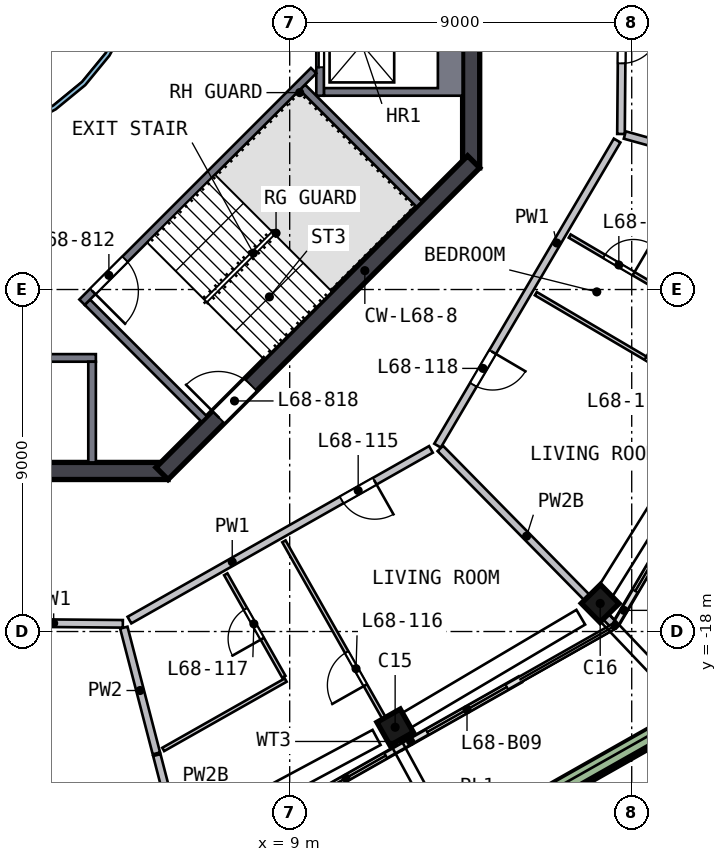
"""IFC4 building model, lengths in metres.
Left out: names, types, materials, properties, quantities, classifications, styles, units other than length and angle.
Written with IfcOpenShell. Run it as: python <this file> out.ifc"""

import sys

from ifc_helpers import new_model, si_unit, direction, frame, frame_2d, origin, origin_2d, place, context, subcontext, project, spatial, polyline, rectangle, outline, extrude, element, fill, save


model = new_model("IFC4")
c1 = context("Model", 3, precision=1e-05, world=origin(), true_north=direction((0.0, 1.0)))
c2 = subcontext(c1, "Body", "Model", "MODEL_VIEW")
j1 = project(units=[si_unit("LENGTHUNIT", "METRE"), si_unit("PLANEANGLEUNIT", "RADIAN")], contexts=[c1])
p1 = place(None, origin())
s1 = spatial("IfcSite", under=j1, at=p1, CompositionType="ELEMENT")
p2 = place(p1, origin())
s2 = spatial("IfcBuilding", under=s1, at=p2, CompositionType="ELEMENT")
p3 = place(p2, frame((0.0, 0.0, 277.5)))
s3 = spatial("IfcBuildingStorey", under=s2, at=p3, CompositionType="ELEMENT", Elevation=277.5)
p4 = place(p3, frame((11.657, -20.587, 0.0), z_axis=(0.097493601, 0.056275557, 0.993643829), x_axis=(0.864752693, 0.4894198, -0.112565713)))
e1 = element("IfcColumn", 1, at=p4, inside=s3, PredefinedType="COLUMN", context=c2, shape_type="SweptSolid", body=[
    extrude(rectangle(XDim=0.7, YDim=0.7, at=origin_2d()), origin(), (0.0, 0.0, 1.0), 3.21),
])
p5 = place(p3, frame((17.072, -17.36, 0.0), z_axis=(0.081873788, 0.081797768, 0.993280327), x_axis=(-0.708616908, -0.696037958, 0.115729164)))
e2 = element("IfcColumn", 2, at=p5, inside=s3, PredefinedType="COLUMN", context=c2, shape_type="SweptSolid", body=[
    extrude(rectangle(XDim=0.7, YDim=0.7, at=origin_2d()), origin(), (0.0, 0.0, 1.0), 3.211),
])
p6 = place(p3, frame((13.775, -5.799, 0.0), z_axis=(0.0, 0.0, 1.0), x_axis=(0.0, 1.0, 0.0)))
e3 = element("IfcWall", 3, at=p6, inside=s3, PredefinedType="SHEAR", context=c2, shape_type="SweptSolid", body=[
    extrude(rectangle(XDim=11.598, YDim=0.45, at=frame_2d((5.799, 0.0))), origin(), (0.0, 0.0, 1.0), 3.5),
])
p7 = place(p6, frame((4.899, 0.0, 0.0)))
e4 = element("IfcOpeningElement", 4, at=p7, cuts=e3, PredefinedType="OPENING", context=c2, shape_type="SweptSolid", body=[
    extrude(rectangle(XDim=1.8, YDim=2.1, at=frame_2d((0.9, 1.05))), frame((0.0, 0.235, 0.0), z_axis=(0.0, -1.0, 0.0), x_axis=(1.0, 0.0, 0.0)), (0.0, 0.0, 1.0), 0.47),
])
p8 = place(p3, frame((-5.799, -13.775, 0.0), z_axis=(0.0, 0.0, 1.0), x_axis=(1.0, 0.0, 0.0)))
e5 = element("IfcWall", 5, at=p8, inside=s3, PredefinedType="SHEAR", context=c2, shape_type="SweptSolid", body=[
    extrude(rectangle(XDim=11.598, YDim=0.45, at=frame_2d((5.799, 0.0))), origin(), (0.0, 0.0, 1.0), 3.5),
])
p9 = place(p3, frame((5.64, -13.841, 0.0), z_axis=(0.0, 0.0, 1.0), x_axis=(0.707106781, 0.707106781, 0.0)))
e6 = element("IfcWall", 6, at=p9, inside=s3, PredefinedType="SHEAR", context=c2, shape_type="SweptSolid", body=[
    extrude(rectangle(XDim=11.598, YDim=0.45, at=frame_2d((5.799, 0.0))), origin(), (0.0, 0.0, 1.0), 3.5),
])
p10 = place(p9, frame((2.099, 0.0, 0.0)))
e7 = element("IfcOpeningElement", 7, at=p10, cuts=e6, PredefinedType="OPENING", context=c2, shape_type="SweptSolid", body=[
    extrude(rectangle(XDim=1.2, YDim=2.1, at=frame_2d((0.6, 1.05))), frame((0.0, 0.235, 0.0), z_axis=(0.0, -1.0, 0.0), x_axis=(1.0, 0.0, 0.0)), (0.0, 0.0, 1.0), 0.47),
])
p11 = place(p3, frame((9.088, -22.645, 0.0), z_axis=(0.0, 0.0, 1.0), x_axis=(0.870191834, 0.492713073, 0.0)))
e8 = element("IfcWall", 8, at=p11, inside=s3, PredefinedType="SOLIDWALL", context=c2, shape_type="SweptSolid", body=[
    extrude(rectangle(XDim=3.25, YDim=0.15, at=frame_2d((1.625, 0.0))), origin(), (0.0, 0.0, 1.0), 2.525),
])
p12 = place(p11, frame((0.4, 0.0, 0.0)))
e9 = element("IfcOpeningElement", 9, at=p12, cuts=e8, PredefinedType="OPENING", context=c2, shape_type="SweptSolid", body=[
    extrude(rectangle(XDim=2.4, YDim=2.4, at=frame_2d((1.2, 1.2))), frame((0.0, 0.085, 0.0), z_axis=(0.0, -1.0, 0.0), x_axis=(1.0, 0.0, 0.0)), (0.0, 0.0, 1.0), 0.17),
])
p13 = place(p3, frame((11.916, -21.044, 0.0), z_axis=(0.0, 0.0, 1.0), x_axis=(0.870199981, 0.492698684, 0.0)))
e10 = element("IfcWall", 10, at=p13, inside=s3, PredefinedType="SOLIDWALL", context=c2, shape_type="SweptSolid", body=[
    extrude(rectangle(XDim=3.611, YDim=0.15, at=frame_2d((1.806, 0.0))), origin(), (0.0, 0.0, 1.0), 2.525),
])
p14 = place(p13, frame((0.811, 0.0, 0.0)))
e11 = element("IfcOpeningElement", 11, at=p14, cuts=e10, PredefinedType="OPENING", context=c2, shape_type="SweptSolid", body=[
    extrude(rectangle(XDim=2.4, YDim=2.4, at=frame_2d((1.2, 1.2))), frame((0.0, 0.085, 0.0), z_axis=(0.0, -1.0, 0.0), x_axis=(1.0, 0.0, 0.0)), (0.0, 0.0, 1.0), 0.17),
])
p15 = place(p3, frame((17.595, -17.782, 0.0), z_axis=(0.0, 0.0, 1.0), x_axis=(0.507242714, 0.861803243, 0.0)))
e12 = element("IfcWall", 12, at=p15, inside=s3, PredefinedType="SOLIDWALL", context=c2, shape_type="SweptSolid", body=[
    extrude(rectangle(XDim=3.786, YDim=0.15, at=frame_2d((1.893, 0.0))), origin(), (0.0, 0.0, 1.0), 2.525),
])
p16 = place(p15, frame((0.987, 0.0, 0.0)))
e13 = element("IfcOpeningElement", 13, at=p16, cuts=e12, PredefinedType="OPENING", context=c2, shape_type="SweptSolid", body=[
    extrude(rectangle(XDim=2.4, YDim=2.4, at=frame_2d((1.2, 1.2))), frame((0.0, 0.085, 0.0), z_axis=(0.0, -1.0, 0.0), x_axis=(1.0, 0.0, 0.0)), (0.0, 0.0, 1.0), 0.17),
])
p17 = place(p3, frame((8.185, -26.633, 0.0), z_axis=(0.0, 0.0, 1.0), x_axis=(0.870181581, 0.492731181, 0.0)))
e14 = element("IfcWall", 14, at=p17, inside=s3, PredefinedType="SOLIDWALL", context=c2, shape_type="SweptSolid", body=[
    extrude(rectangle(XDim=13.223, YDim=0.5, at=frame_2d((6.612, 0.0))), origin(), (0.0, 0.0, 1.0), 0.7),
])
p18 = place(p3, origin())
e15 = element("IfcWall", 15, at=p18, inside=s3, PredefinedType="SOLIDWALL", context=c2, shape_type="SweptSolid", body=[
    extrude(outline(polyline([(13.55, -3.9), (9.9, -3.9), (9.9, -3.7), (12.9, -3.7), (12.9, -1.4), (9.9, -1.4), (9.9, -1.2), (13.55, -1.2), (13.55, -3.9)])), origin(), (0.0, 0.0, 1.0), 3.19),
])
p19 = place(p3, frame((9.8, -1.2, 0.0), z_axis=(0.0, 0.0, 1.0), x_axis=(0.0, -1.0, 0.0)))
e16 = element("IfcWall", 16, at=p19, inside=s3, PredefinedType="SOLIDWALL", context=c2, shape_type="SweptSolid", body=[
    extrude(rectangle(XDim=2.7, YDim=0.2, at=frame_2d((1.35, 0.0))), origin(), (0.0, 0.0, 1.0), 3.19),
])
p20 = place(p19, frame((0.75, 0.0, 0.0)))
e17 = element("IfcOpeningElement", 17, at=p20, cuts=e16, PredefinedType="OPENING", context=c2, shape_type="SweptSolid", body=[
    extrude(rectangle(XDim=1.2, YDim=2.1, at=frame_2d((0.6, 1.05))), frame((0.0, 0.11, 0.0), z_axis=(0.0, -1.0, 0.0), x_axis=(1.0, 0.0, 0.0)), (0.0, 0.0, 1.0), 0.22),
])
p21 = place(p3, frame((-3.9, -10.8, 0.0), z_axis=(0.0, 0.0, 1.0), x_axis=(1.0, 0.0, 0.0)))
e18 = element("IfcWall", 18, at=p21, inside=s3, PredefinedType="SOLIDWALL", context=c2, shape_type="SweptSolid", body=[
    extrude(rectangle(XDim=7.8, YDim=0.2, at=frame_2d((3.9, 0.0))), origin(), (0.0, 0.0, 1.0), 3.19),
])
p22 = place(p21, frame((3.45, 0.0, 0.0)))
e19 = element("IfcOpeningElement", 19, at=p22, cuts=e18, PredefinedType="OPENING", context=c2, shape_type="SweptSolid", body=[
    extrude(rectangle(XDim=0.9, YDim=2.1, at=frame_2d((0.45, 1.05))), frame((0.0, 0.11, 0.0), z_axis=(0.0, -1.0, 0.0), x_axis=(1.0, 0.0, 0.0)), (0.0, 0.0, 1.0), 0.22),
])
p23 = place(p3, frame((3.8, -10.9, 0.0), z_axis=(0.0, 0.0, 1.0), x_axis=(0.0, -1.0, 0.0)))
e20 = element("IfcWall", 20, at=p23, inside=s3, PredefinedType="SOLIDWALL", context=c2, shape_type="SweptSolid", body=[
    extrude(rectangle(XDim=2.65, YDim=0.2, at=frame_2d((1.325, 0.0))), origin(), (0.0, 0.0, 1.0), 3.19),
])
p24 = place(p3, frame((9.629, -3.24, 0.0), z_axis=(0.0, 0.0, 1.0), x_axis=(-0.707120946, -0.707092617, 0.0)))
e21 = element("IfcWall", 21, at=p24, inside=s3, PredefinedType="SOLIDWALL", context=c2, shape_type="SweptSolid", body=[
    extrude(rectangle(XDim=8.618, YDim=0.2, at=frame_2d((4.309, 0.0))), origin(), (0.0, 0.0, 1.0), 3.19),
])
p25 = place(p24, frame((7.018, 0.0, 0.0)))
e22 = element("IfcOpeningElement", 22, at=p25, cuts=e21, PredefinedType="OPENING", context=c2, shape_type="SweptSolid", body=[
    extrude(rectangle(XDim=1.2, YDim=2.1, at=frame_2d((0.6, 1.05))), frame((0.0, 0.11, 0.0), z_axis=(0.0, -1.0, 0.0), x_axis=(1.0, 0.0, 0.0)), (0.0, 0.0, 1.0), 0.22),
])
for number, where, z_axis, x_axis in (
    (23, (3.677, -9.334, 0.0), (0.0, 0.0, 1.0), (0.707, -0.707, 0.0)),
    (24, (9.334, -3.677, 0.0), (0.0, 0.0, 1.0), (0.707, -0.707, 0.0)),
):
    element("IfcWall", number, at=place(p3, frame(where, z_axis=z_axis, x_axis=x_axis)), inside=s3, PredefinedType="SOLIDWALL", context=c2, shape_type="SweptSolid", body=[
        extrude(rectangle(XDim=4.35, YDim=0.2, at=frame_2d((2.175, 0.0))), origin(), (0.0, 0.0, 1.0), 3.19),
    ])
p26 = place(p3, origin())
e25 = element("IfcWall", 25, at=p26, inside=s3, PredefinedType="SOLIDWALL", context=c2, shape_type="SweptSolid", body=[
    extrude(outline(polyline([(5.021, -0.999), (4.73, -1.959), (4.257, -2.844), (3.62, -3.62), (2.844, -4.257), (1.959, -4.73), (0.999, -5.021), (0.0, -5.12), (-0.999, -5.021), (-1.959, -4.73), (-2.844, -4.257), (-3.62, -3.62), (-4.257, -2.844), (-4.73, -1.959), (-5.021, -0.999), (-5.12, 0.0), (-5.021, 0.999), (-4.73, 1.959), (-4.257, 2.844), (-3.62, 3.62), (-2.844, 4.257), (-1.959, 4.73), (-0.999, 5.021), (0.0, 5.12), (0.999, 5.021), (1.959, 4.73), (2.844, 4.257), (3.62, 3.62), (4.257, 2.844), (4.73, 1.959), (5.021, 0.999), (5.12, 0.0), (5.021, -0.999)]), holes=[polyline([(4.904, 0.976), (4.619, 1.913), (4.157, 2.778), (3.535, 3.535), (2.778, 4.157), (1.913, 4.619), (0.976, 4.904), (0.0, 5.0), (-0.976, 4.904), (-1.913, 4.619), (-2.778, 4.157), (-3.535, 3.535), (-4.157, 2.778), (-4.619, 1.913), (-4.904, 0.976), (-5.0, 0.0), (-4.904, -0.976), (-4.619, -1.913), (-4.157, -2.778), (-3.535, -3.535), (-2.778, -4.157), (-1.913, -4.619), (-0.976, -4.904), (0.0, -5.0), (0.976, -4.904), (1.913, -4.619), (2.778, -4.157), (3.535, -3.535), (4.157, -2.778), (4.619, -1.913), (4.904, -0.976), (5.0, 0.0), (4.904, 0.976)])]), origin(), (0.0, 0.0, 1.0), 3.19),
])
p27 = place(p3, frame((4.609, -17.798, 0.0), z_axis=(0.0, 0.0, 1.0), x_axis=(-0.99996484, 0.008385669, 0.0)))
e26 = element("IfcWall", 26, at=p27, inside=s3, PredefinedType="SOLIDWALL", context=c2, shape_type="SweptSolid", body=[
    extrude(rectangle(XDim=9.316, YDim=0.2, at=frame_2d((4.658, 0.0))), origin(), (0.0, 0.0, 1.0), 3.19),
])
p28 = place(p27, frame((3.84, 0.0, 0.0)))
e27 = element("IfcOpeningElement", 27, at=p28, cuts=e26, PredefinedType="OPENING", context=c2, shape_type="SweptSolid", body=[
    extrude(rectangle(XDim=1.8, YDim=2.1, at=frame_2d((0.9, 1.05))), frame((0.0, 0.11, 0.0), z_axis=(0.0, -1.0, 0.0), x_axis=(1.0, 0.0, 0.0)), (0.0, 0.0, 1.0), 0.22),
])
p29 = place(p3, frame((12.717, -13.207, 0.0), z_axis=(0.0, 0.0, 1.0), x_axis=(-0.870186015, -0.492723349, 0.0)))
e28 = element("IfcWall", 28, at=p29, inside=s3, PredefinedType="SOLIDWALL", context=c2, shape_type="SweptSolid", body=[
    extrude(rectangle(XDim=9.116, YDim=0.2, at=frame_2d((4.558, 0.0))), origin(), (0.0, 0.0, 1.0), 3.19),
])
p30 = place(p29, frame((1.7, 0.0, 0.0)))
e29 = element("IfcOpeningElement", 29, at=p30, cuts=e28, PredefinedType="OPENING", context=c2, shape_type="SweptSolid", body=[
    extrude(rectangle(XDim=1.0, YDim=2.1, at=frame_2d((0.5, 1.05))), frame((0.0, 0.11, 0.0), z_axis=(0.0, -1.0, 0.0), x_axis=(1.0, 0.0, 0.0)), (0.0, 0.0, 1.0), 0.22),
])
p31 = place(p3, frame((17.616, -5.079, 0.0), z_axis=(0.0, 0.0, 1.0), x_axis=(-0.507248004, -0.861800129, 0.0)))
e30 = element("IfcWall", 30, at=p31, inside=s3, PredefinedType="SOLIDWALL", context=c2, shape_type="SweptSolid", body=[
    extrude(rectangle(XDim=9.317, YDim=0.2, at=frame_2d((4.658, 0.0))), origin(), (0.0, 0.0, 1.0), 3.19),
])
p32 = place(p31, frame((6.458, 0.0, 0.0)))
e31 = element("IfcOpeningElement", 31, at=p32, cuts=e30, PredefinedType="OPENING", context=c2, shape_type="SweptSolid", body=[
    extrude(rectangle(XDim=1.0, YDim=2.1, at=frame_2d((0.5, 1.05))), frame((0.0, 0.11, 0.0), z_axis=(0.0, -1.0, 0.0), x_axis=(1.0, 0.0, 0.0)), (0.0, 0.0, 1.0), 0.22),
])
p33 = place(p3, frame((17.796, 4.409, 0.0), z_axis=(0.0, 0.0, 1.0), x_axis=(-0.008385449, -0.999964842, 0.0)))
e32 = element("IfcWall", 32, at=p33, inside=s3, PredefinedType="SOLIDWALL", context=c2, shape_type="SweptSolid", body=[
    extrude(rectangle(XDim=9.317, YDim=0.2, at=frame_2d((4.658, 0.0))), origin(), (0.0, 0.0, 1.0), 3.19),
])
p34 = place(p33, frame((6.458, 0.0, 0.0)))
e33 = element("IfcOpeningElement", 33, at=p34, cuts=e32, PredefinedType="OPENING", context=c2, shape_type="SweptSolid", body=[
    extrude(rectangle(XDim=1.0, YDim=2.1, at=frame_2d((0.5, 1.05))), frame((0.0, 0.11, 0.0), z_axis=(0.0, -1.0, 0.0), x_axis=(1.0, 0.0, 0.0)), (0.0, 0.0, 1.0), 0.22),
])
p35 = place(p3, frame((4.635, -17.898, 0.0), z_axis=(0.0, 0.0, 1.0), x_axis=(0.250744047, -0.968053419, 0.0)))
e34 = element("IfcWall", 34, at=p35, inside=s3, PredefinedType="SOLIDWALL", context=c2, shape_type="SweptSolid", body=[
    extrude(rectangle(XDim=3.418, YDim=0.2, at=frame_2d((1.709, 0.0))), origin(), (0.0, 0.0, 1.0), 3.19),
])
p36 = place(p3, frame((5.504, -21.251, 0.0), z_axis=(0.0, 0.0, 1.0), x_axis=(0.250672354, -0.968071986, 0.0)))
e35 = element("IfcWall", 35, at=p36, inside=s3, PredefinedType="SOLIDWALL", context=c2, shape_type="SweptSolid", body=[
    extrude(rectangle(XDim=3.011, YDim=0.2, at=frame_2d((1.506, 0.0))), origin(), (0.0, 0.0, 1.0), 2.69),
])
p37 = place(p3, frame((12.963, -13.182, 0.0), z_axis=(0.0, 0.0, 1.0), x_axis=(0.701182118, -0.712982214, 0.0)))
e36 = element("IfcWall", 36, at=p37, inside=s3, PredefinedType="SOLIDWALL", context=c2, shape_type="SweptSolid", body=[
    extrude(rectangle(XDim=6.476, YDim=0.2, at=frame_2d((3.238, 0.0))), origin(), (0.0, 0.0, 1.0), 2.69),
])
p38 = place(p3, frame((17.818, -4.935, 0.0), z_axis=(0.0, 0.0, 1.0), x_axis=(0.963722387, -0.266906652, 0.0)))
e37 = element("IfcWall", 37, at=p38, inside=s3, PredefinedType="SOLIDWALL", context=c2, shape_type="SweptSolid", body=[
    extrude(rectangle(XDim=3.417, YDim=0.2, at=frame_2d((1.708, 0.0))), origin(), (0.0, 0.0, 1.0), 3.19),
])
p39 = place(p3, frame((5.672, -21.103, 0.0), z_axis=(0.0, 0.0, 1.0), x_axis=(0.870195537, 0.492706532, 0.0)))
e38 = element("IfcWall", 38, at=p39, inside=s3, PredefinedType="PARTITIONING", context=c2, shape_type="SweptSolid", body=[
    extrude(rectangle(XDim=3.704, YDim=0.1, at=frame_2d((1.852, 0.0))), origin(), (0.0, 0.0, 1.0), 3.19),
])
p40 = place(p3, frame((8.846, -19.191, 0.0), z_axis=(0.0, 0.0, 1.0), x_axis=(-0.492708506, 0.870194419, 0.0)))
e39 = element("IfcWall", 39, at=p40, inside=s3, PredefinedType="PARTITIONING", context=c2, shape_type="SweptSolid", body=[
    extrude(rectangle(XDim=3.1, YDim=0.1, at=frame_2d((1.55, 0.0))), origin(), (0.0, 0.0, 1.0), 3.19),
])
p41 = place(p40, frame((1.15, 0.0, 0.0)))
e40 = element("IfcOpeningElement", 40, at=p41, cuts=e39, PredefinedType="OPENING", context=c2, shape_type="SweptSolid", body=[
    extrude(rectangle(XDim=0.9, YDim=2.1, at=frame_2d((0.45, 1.05))), frame((0.0, 0.06, 0.0), z_axis=(0.0, -1.0, 0.0), x_axis=(1.0, 0.0, 0.0)), (0.0, 0.0, 1.0), 0.12),
])
p42 = place(p3, frame((11.879, -20.979, 0.0), z_axis=(0.0, 0.0, 1.0), x_axis=(-0.492715069, 0.870190704, 0.0)))
e41 = element("IfcWall", 41, at=p42, inside=s3, PredefinedType="PARTITIONING", context=c2, shape_type="SweptSolid", body=[
    extrude(rectangle(XDim=6.15, YDim=0.1, at=frame_2d((3.075, 0.0))), origin(), (0.0, 0.0, 1.0), 3.19),
])
p43 = place(p42, frame((1.8, 0.0, 0.0)))
e42 = element("IfcOpeningElement", 42, at=p43, cuts=e41, PredefinedType="OPENING", context=c2, shape_type="SweptSolid", body=[
    extrude(rectangle(XDim=1.0, YDim=2.1, at=frame_2d((0.5, 1.05))), frame((0.0, 0.06, 0.0), z_axis=(0.0, -1.0, 0.0), x_axis=(1.0, 0.0, 0.0)), (0.0, 0.0, 1.0), 0.12),
])
p44 = place(p3, frame((16.368, -7.594, 0.0), z_axis=(0.0, 0.0, 1.0), x_axis=(0.861798542, -0.5072507, 0.0)))
e43 = element("IfcWall", 43, at=p44, inside=s3, PredefinedType="PARTITIONING", context=c2, shape_type="SweptSolid", body=[
    extrude(rectangle(XDim=3.1, YDim=0.1, at=frame_2d((1.55, 0.0))), origin(), (0.0, 0.0, 1.0), 3.19),
])
p45 = place(p44, frame((1.05, 0.0, 0.0)))
e44 = element("IfcOpeningElement", 44, at=p45, cuts=e43, PredefinedType="OPENING", context=c2, shape_type="SweptSolid", body=[
    extrude(rectangle(XDim=0.9, YDim=2.1, at=frame_2d((0.45, 1.05))), frame((0.0, 0.06, 0.0), z_axis=(0.0, -1.0, 0.0), x_axis=(1.0, 0.0, 0.0)), (0.0, 0.0, 1.0), 0.12),
])
p46 = place(p3, frame((15.477, -9.109, 0.0), z_axis=(0.0, 0.0, 1.0), x_axis=(0.861795394, -0.507256048, 0.0)))
e45 = element("IfcWall", 45, at=p46, inside=s3, PredefinedType="PARTITIONING", context=c2, shape_type="SweptSolid", body=[
    extrude(rectangle(XDim=6.15, YDim=0.1, at=frame_2d((3.075, 0.0))), origin(), (0.0, 0.0, 1.0), 3.19),
])
p47 = place(p46, frame((3.35, 0.0, 0.0)))
e46 = element("IfcOpeningElement", 46, at=p47, cuts=e45, PredefinedType="OPENING", context=c2, shape_type="SweptSolid", body=[
    extrude(rectangle(XDim=1.0, YDim=2.1, at=frame_2d((0.5, 1.05))), frame((0.0, 0.06, 0.0), z_axis=(0.0, -1.0, 0.0), x_axis=(1.0, 0.0, 0.0)), (0.0, 0.0, 1.0), 0.12),
])
p48 = place(p12, origin())
e47 = element("IfcDoor", 47, at=p48, inside=s3, OperationType="SLIDING_TO_RIGHT", PredefinedType="DOOR", context=c2, shape_type="SweptSolid", body=[
    extrude(rectangle(XDim=2.4, YDim=2.4, at=frame_2d((1.2, 1.2))), frame((0.0, 0.025, 0.0), z_axis=(0.0, -1.0, 0.0), x_axis=(1.0, 0.0, 0.0)), (0.0, 0.0, 1.0), 0.05),
])
fill(e9, e47)
p49 = place(p14, origin())
e48 = element("IfcDoor", 48, at=p49, inside=s3, OperationType="SLIDING_TO_LEFT", PredefinedType="DOOR", context=c2, shape_type="SweptSolid", body=[
    extrude(rectangle(XDim=2.4, YDim=2.4, at=frame_2d((1.2, 1.2))), frame((0.0, 0.025, 0.0), z_axis=(0.0, -1.0, 0.0), x_axis=(1.0, 0.0, 0.0)), (0.0, 0.0, 1.0), 0.05),
])
fill(e11, e48)
p50 = place(p16, origin())
e49 = element("IfcDoor", 49, at=p50, inside=s3, OperationType="SLIDING_TO_LEFT", PredefinedType="DOOR", context=c2, shape_type="SweptSolid", body=[
    extrude(rectangle(XDim=2.4, YDim=2.4, at=frame_2d((1.2, 1.2))), frame((0.0, 0.025, 0.0), z_axis=(0.0, -1.0, 0.0), x_axis=(1.0, 0.0, 0.0)), (0.0, 0.0, 1.0), 0.05),
])
fill(e13, e49)
p51 = place(p20, origin())
e50 = element("IfcDoor", 50, at=p51, inside=s3, OperationType="DOUBLE_DOOR_SLIDING", PredefinedType="DOOR", context=c2, shape_type="SweptSolid", body=[
    extrude(rectangle(XDim=1.2, YDim=2.1, at=frame_2d((0.6, 1.05))), frame((0.0, 0.025, 0.0), z_axis=(0.0, -1.0, 0.0), x_axis=(1.0, 0.0, 0.0)), (0.0, 0.0, 1.0), 0.05),
])
fill(e17, e50)
p52 = place(p25, origin())
e51 = element("IfcDoor", 51, at=p52, inside=s3, OperationType="SINGLE_SWING_RIGHT", PredefinedType="DOOR", context=c2, shape_type="SweptSolid", body=[
    extrude(rectangle(XDim=1.2, YDim=2.1, at=frame_2d((0.6, 1.05))), frame((0.0, 0.025, 0.0), z_axis=(0.0, -1.0, 0.0), x_axis=(1.0, 0.0, 0.0)), (0.0, 0.0, 1.0), 0.05),
])
fill(e22, e51)
p53 = place(p10, origin())
e52 = element("IfcDoor", 52, at=p53, inside=s3, OperationType="SINGLE_SWING_LEFT", PredefinedType="DOOR", context=c2, shape_type="SweptSolid", body=[
    extrude(rectangle(XDim=1.2, YDim=2.1, at=frame_2d((0.6, 1.05))), frame((0.0, 0.025, 0.0), z_axis=(0.0, -1.0, 0.0), x_axis=(1.0, 0.0, 0.0)), (0.0, 0.0, 1.0), 0.05),
])
fill(e7, e52)
p54 = place(p30, origin())
e53 = element("IfcDoor", 53, at=p54, inside=s3, OperationType="SINGLE_SWING_LEFT", PredefinedType="DOOR", context=c2, shape_type="SweptSolid", body=[
    extrude(rectangle(XDim=1.0, YDim=2.1, at=frame_2d((0.5, 1.05))), frame((0.0, 0.025, 0.0), z_axis=(0.0, -1.0, 0.0), x_axis=(1.0, 0.0, 0.0)), (0.0, 0.0, 1.0), 0.05),
])
fill(e29, e53)
p55 = place(p43, origin())
e54 = element("IfcDoor", 54, at=p55, inside=s3, OperationType="SINGLE_SWING_LEFT", PredefinedType="DOOR", context=c2, shape_type="SweptSolid", body=[
    extrude(rectangle(XDim=1.0, YDim=2.1, at=frame_2d((0.5, 1.05))), frame((0.0, 0.025, 0.0), z_axis=(0.0, -1.0, 0.0), x_axis=(1.0, 0.0, 0.0)), (0.0, 0.0, 1.0), 0.05),
])
fill(e42, e54)
p56 = place(p41, origin())
e55 = element("IfcDoor", 55, at=p56, inside=s3, OperationType="SINGLE_SWING_LEFT", PredefinedType="DOOR", context=c2, shape_type="SweptSolid", body=[
    extrude(rectangle(XDim=0.9, YDim=2.1, at=frame_2d((0.45, 1.05))), frame((0.0, 0.025, 0.0), z_axis=(0.0, -1.0, 0.0), x_axis=(1.0, 0.0, 0.0)), (0.0, 0.0, 1.0), 0.05),
])
fill(e40, e55)
p57 = place(p32, origin())
e56 = element("IfcDoor", 56, at=p57, inside=s3, OperationType="SINGLE_SWING_LEFT", PredefinedType="DOOR", context=c2, shape_type="SweptSolid", body=[
    extrude(rectangle(XDim=1.0, YDim=2.1, at=frame_2d((0.5, 1.05))), frame((0.0, 0.025, 0.0), z_axis=(0.0, -1.0, 0.0), x_axis=(1.0, 0.0, 0.0)), (0.0, 0.0, 1.0), 0.05),
])
fill(e31, e56)
p58 = place(p47, origin())
e57 = element("IfcDoor", 57, at=p58, inside=s3, OperationType="SINGLE_SWING_LEFT", PredefinedType="DOOR", context=c2, shape_type="SweptSolid", body=[
    extrude(rectangle(XDim=1.0, YDim=2.1, at=frame_2d((0.5, 1.05))), frame((0.0, 0.025, 0.0), z_axis=(0.0, -1.0, 0.0), x_axis=(1.0, 0.0, 0.0)), (0.0, 0.0, 1.0), 0.05),
])
fill(e46, e57)
p59 = place(p45, origin())
e58 = element("IfcDoor", 58, at=p59, inside=s3, OperationType="SINGLE_SWING_RIGHT", PredefinedType="DOOR", context=c2, shape_type="SweptSolid", body=[
    extrude(rectangle(XDim=0.9, YDim=2.1, at=frame_2d((0.45, 1.05))), frame((0.0, 0.025, 0.0), z_axis=(0.0, -1.0, 0.0), x_axis=(1.0, 0.0, 0.0)), (0.0, 0.0, 1.0), 0.05),
])
fill(e44, e58)
p60 = place(p34, origin())
e59 = element("IfcDoor", 59, at=p60, inside=s3, OperationType="SINGLE_SWING_LEFT", PredefinedType="DOOR", context=c2, shape_type="SweptSolid", body=[
    extrude(rectangle(XDim=1.0, YDim=2.1, at=frame_2d((0.5, 1.05))), frame((0.0, 0.025, 0.0), z_axis=(0.0, -1.0, 0.0), x_axis=(1.0, 0.0, 0.0)), (0.0, 0.0, 1.0), 0.05),
])
fill(e33, e59)
save(model, sys.argv[1])
